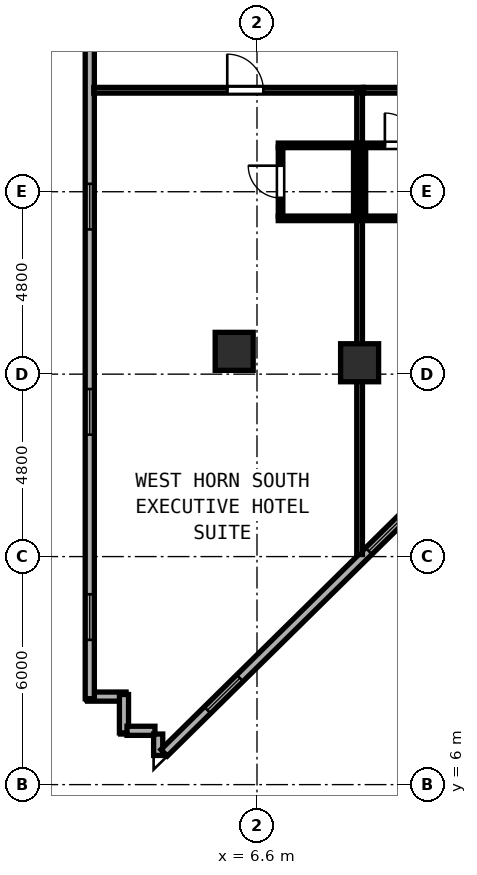
"""IFC4 building model, lengths in metres.
Left out: names, types, materials, properties, quantities, classifications, styles, units other than length and angle.
Written with IfcOpenShell. Run it as: python <this file> out.ifc"""

import sys

from ifc_helpers import new_model, si_unit, direction, frame, frame_2d, origin, origin_2d, place, context, subcontext, project, spatial, rectangle, hollow_rectangle, extrude, element, fill, save


model = new_model("IFC4")
c1 = context("Model", 3, precision=1e-05, world=origin(), true_north=direction((0.0, 1.0)))
c2 = subcontext(c1, "Body", "Model", "MODEL_VIEW")
j1 = project(units=[si_unit("LENGTHUNIT", "METRE"), si_unit("PLANEANGLEUNIT", "RADIAN")], contexts=[c1])
p1 = place(None, origin())
s1 = spatial("IfcSite", under=j1, at=p1, CompositionType="ELEMENT")
p2 = place(p1, origin())
s2 = spatial("IfcBuilding", under=s1, at=p2, CompositionType="ELEMENT")
p3 = place(p2, frame((0.0, 0.0, 47.6)))
s3 = spatial("IfcBuildingStorey", under=s2, at=p3, CompositionType="ELEMENT", Elevation=47.6)
for number, where, z_axis, x_axis in (
    (1, (6.0, 17.4, 0.0), (0.0, 0.0, 1.0), (1.0, 0.0, 0.0)),
    (2, (9.3, 17.1, 0.0), (0.0, 0.0, 1.0), (1.0, 0.0, 0.0)),
):
    element("IfcColumn", number, at=place(p3, frame(where, z_axis=z_axis, x_axis=x_axis)), inside=s3, PredefinedType="COLUMN", context=c2, shape_type="SweptSolid", body=[
        extrude(hollow_rectangle(XDim=1.0, YDim=1.0, WallThickness=0.038, at=origin_2d()), origin(), (0.0, 0.0, 1.0), 3.8),
    ])
for number, where, z_axis, x_axis in (
    (3, (2.145, 8.316, 0.0), (0.0, 0.0, 1.0), (1.0, 0.0, 0.0)),
    (4, (3.1, 8.371, 0.0), (0.0, 0.0, 1.0), (0.0, -1.0, 0.0)),
):
    element("IfcWall", number, at=place(p3, frame(where, z_axis=z_axis, x_axis=x_axis)), inside=s3, PredefinedType="SOLIDWALL", context=c2, shape_type="SweptSolid", body=[
        extrude(rectangle(XDim=1.01, YDim=0.24, at=frame_2d((0.505, 0.0))), origin(), (0.0, 0.0, 1.0), 3.6),
    ])
p4 = place(p3, frame((3.18, 7.416, 0.0), z_axis=(0.0, 0.0, 1.0), x_axis=(1.0, 0.0, 0.0)))
e5 = element("IfcWall", 5, at=p4, inside=s3, PredefinedType="SOLIDWALL", context=c2, shape_type="SweptSolid", body=[
    extrude(rectangle(XDim=0.735, YDim=0.24, at=frame_2d((0.368, 0.0))), origin(), (0.0, 0.0, 1.0), 3.6),
])
p5 = place(p3, frame((4.0, 7.331, 0.0), z_axis=(0.0, 0.0, 1.0), x_axis=(0.0, -1.0, 0.0)))
e6 = element("IfcWall", 6, at=p5, inside=s3, PredefinedType="SOLIDWALL", context=c2, shape_type="SweptSolid", body=[
    extrude(rectangle(XDim=0.563, YDim=0.24, at=frame_2d((0.282, 0.0))), origin(), (0.0, 0.0, 1.0), 3.6),
])
p6 = place(p3, frame((4.156, 6.837, 0.0), z_axis=(0.0, 0.0, 1.0), x_axis=(0.712195287167, 0.701981390735, 0.0)))
e7 = element("IfcWall", 7, at=p6, inside=s3, PredefinedType="SOLIDWALL", context=c2, shape_type="SweptSolid", body=[
    extrude(rectangle(XDim=10.9, YDim=0.24, at=frame_2d((5.45, 0.0))), origin(), (0.0, 0.0, 1.0), 3.6),
])
p7 = place(p6, frame((1.6, 0.0, 0.85)))
e8 = element("IfcOpeningElement", 8, at=p7, cuts=e7, PredefinedType="OPENING", context=c2, shape_type="SweptSolid", body=[
    extrude(rectangle(XDim=1.2, YDim=1.85, at=frame_2d((0.6, 0.925))), frame((0.0, 0.13, 0.0), z_axis=(0.0, -1.0, 0.0), x_axis=(1.0, 0.0, 0.0)), (0.0, 0.0, 1.0), 0.26),
])
p8 = place(p6, frame((7.561, 0.0, 0.85)))
e9 = element("IfcOpeningElement", 9, at=p8, cuts=e7, PredefinedType="OPENING", context=c2, shape_type="SweptSolid", body=[
    extrude(rectangle(XDim=1.2, YDim=1.85, at=frame_2d((0.6, 0.925))), frame((0.0, 0.13, 0.0), z_axis=(0.0, -1.0, 0.0), x_axis=(1.0, 0.0, 0.0)), (0.0, 0.0, 1.0), 0.26),
])
p9 = place(p3, frame((2.2, 28.808, 0.0), z_axis=(0.0, 0.0, 1.0), x_axis=(0.0, -1.0, 0.0)))
e10 = element("IfcWall", 10, at=p9, inside=s3, PredefinedType="SOLIDWALL", context=c2, shape_type="SweptSolid", body=[
    extrude(rectangle(XDim=20.547, YDim=0.24, at=frame_2d((10.274, 0.0))), origin(), (0.0, 0.0, 1.0), 3.6),
])
p10 = place(p9, frame((1.093, 0.0, 0.85)))
e11 = element("IfcOpeningElement", 11, at=p10, cuts=e10, PredefinedType="OPENING", context=c2, shape_type="SweptSolid", body=[
    extrude(rectangle(XDim=1.2, YDim=1.85, at=frame_2d((0.6, 0.925))), frame((0.0, 0.13, 0.0), z_axis=(0.0, -1.0, 0.0), x_axis=(1.0, 0.0, 0.0)), (0.0, 0.0, 1.0), 0.26),
])
p11 = place(p9, frame((7.0, 0.0, 0.85)))
e12 = element("IfcOpeningElement", 12, at=p11, cuts=e10, PredefinedType="OPENING", context=c2, shape_type="SweptSolid", body=[
    extrude(rectangle(XDim=1.2, YDim=1.85, at=frame_2d((0.6, 0.925))), frame((0.0, 0.13, 0.0), z_axis=(0.0, -1.0, 0.0), x_axis=(1.0, 0.0, 0.0)), (0.0, 0.0, 1.0), 0.26),
])
p12 = place(p9, frame((12.4, 0.0, 0.85)))
e13 = element("IfcOpeningElement", 13, at=p12, cuts=e10, PredefinedType="OPENING", context=c2, shape_type="SweptSolid", body=[
    extrude(rectangle(XDim=1.2, YDim=1.85, at=frame_2d((0.6, 0.925))), frame((0.0, 0.13, 0.0), z_axis=(0.0, -1.0, 0.0), x_axis=(1.0, 0.0, 0.0)), (0.0, 0.0, 1.0), 0.26),
])
p13 = place(p9, frame((17.8, 0.0, 0.85)))
e14 = element("IfcOpeningElement", 14, at=p13, cuts=e10, PredefinedType="OPENING", context=c2, shape_type="SweptSolid", body=[
    extrude(rectangle(XDim=1.2, YDim=1.85, at=frame_2d((0.6, 0.925))), frame((0.0, 0.13, 0.0), z_axis=(0.0, -1.0, 0.0), x_axis=(1.0, 0.0, 0.0)), (0.0, 0.0, 1.0), 0.26),
])
p14 = place(p3, frame((2.305, 24.27, 0.0), z_axis=(0.0, 0.0, 1.0), x_axis=(1.0, 0.0, 0.0)))
e15 = element("IfcWall", 15, at=p14, inside=s3, PredefinedType="PARTITIONING", context=c2, shape_type="SweptSolid", body=[
    extrude(rectangle(XDim=7.095, YDim=0.15, at=frame_2d((3.547, 0.0))), origin(), (0.0, 0.0, 1.0), 3.6),
])
p15 = place(p14, frame((4.462, 0.0, 0.0), z_axis=(0.0, 0.0, 1.0), x_axis=(-1.0, 0.0, 0.0)))
e16 = element("IfcOpeningElement", 16, at=p15, cuts=e15, PredefinedType="OPENING", context=c2, shape_type="SweptSolid", body=[
    extrude(rectangle(XDim=0.95, YDim=2.18, at=frame_2d((0.475, 1.09))), frame((0.0, 0.085, 0.0), z_axis=(0.0, -1.0, 0.0), x_axis=(1.0, 0.0, 0.0)), (0.0, 0.0, 1.0), 0.17),
])
p16 = place(p3, frame((9.3, 12.054, 0.0), z_axis=(0.0, 0.0, 1.0), x_axis=(0.0, 1.0, 0.0)))
e17 = element("IfcWall", 17, at=p16, inside=s3, PredefinedType="PARTITIONING", context=c2, shape_type="SweptSolid", body=[
    extrude(rectangle(XDim=12.156, YDim=0.15, at=frame_2d((6.078, 0.0))), origin(), (0.0, 0.0, 1.0), 3.6),
])
for number, where, z_axis, x_axis in (
    (18, (7.16, 22.82, 0.0), (0.0, 0.0, 1.0), (1.0, 0.0, 0.0)),
    (19, (7.16, 20.9, 0.0), (0.0, 0.0, 1.0), (1.0, 0.0, 0.0)),
):
    element("IfcWall", number, at=place(p3, frame(where, z_axis=z_axis, x_axis=x_axis)), inside=s3, PredefinedType="PARTITIONING", context=c2, shape_type="SweptSolid", body=[
        extrude(rectangle(XDim=2.08, YDim=0.12, at=frame_2d((1.04, 0.0))), origin(), (0.0, 0.0, 1.0), 3.6),
    ])
p17 = place(p3, frame((7.22, 20.945, 0.0), z_axis=(0.0, 0.0, 1.0), x_axis=(0.0, 1.0, 0.0)))
e20 = element("IfcWall", 20, at=p17, inside=s3, PredefinedType="PARTITIONING", context=c2, shape_type="SweptSolid", body=[
    extrude(rectangle(XDim=1.83, YDim=0.12, at=frame_2d((0.915, 0.0))), origin(), (0.0, 0.0, 1.0), 3.6),
])
p18 = place(p17, frame((1.34, 0.0, 0.0), z_axis=(0.0, 0.0, 1.0), x_axis=(-1.0, 0.0, 0.0)))
e21 = element("IfcOpeningElement", 21, at=p18, cuts=e20, PredefinedType="OPENING", context=c2, shape_type="SweptSolid", body=[
    extrude(rectangle(XDim=0.85, YDim=2.1, at=frame_2d((0.425, 1.05))), frame((0.0, 0.07, 0.0), z_axis=(0.0, -1.0, 0.0), x_axis=(1.0, 0.0, 0.0)), (0.0, 0.0, 1.0), 0.14),
])
p19 = place(p3, frame((9.2, 20.945, 0.0), z_axis=(0.0, 0.0, 1.0), x_axis=(0.0, 1.0, 0.0)))
e22 = element("IfcWall", 22, at=p19, inside=s3, PredefinedType="PARTITIONING", context=c2, shape_type="SweptSolid", body=[
    extrude(rectangle(XDim=1.83, YDim=0.12, at=frame_2d((0.915, 0.0))), origin(), (0.0, 0.0, 1.0), 3.6),
])
p20 = place(p3, frame((9.402, 24.27, 0.0), z_axis=(0.0, 0.0, 1.0), x_axis=(1.0, 0.0, 0.0)))
e23 = element("IfcWall", 23, at=p20, inside=s3, PredefinedType="PARTITIONING", context=c2, shape_type="SweptSolid", body=[
    extrude(rectangle(XDim=2.296, YDim=0.15, at=frame_2d((1.148, 0.0))), origin(), (0.0, 0.0, 1.0), 3.6),
])
p21 = place(p20, frame((1.934, 0.0, 0.0), z_axis=(0.0, 0.0, 1.0), x_axis=(-1.0, 0.0, 0.0)))
e24 = element("IfcOpeningElement", 24, at=p21, cuts=e23, PredefinedType="OPENING", context=c2, shape_type="SweptSolid", body=[
    extrude(rectangle(XDim=0.95, YDim=2.15, at=frame_2d((0.475, 1.075))), frame((0.0, 0.085, 0.0), z_axis=(0.0, -1.0, 0.0), x_axis=(1.0, 0.0, 0.0)), (0.0, 0.0, 1.0), 0.17),
])
p22 = place(p3, frame((9.36, 22.82, 0.0), z_axis=(0.0, 0.0, 1.0), x_axis=(1.0, 0.0, 0.0)))
e25 = element("IfcWall", 25, at=p22, inside=s3, PredefinedType="PARTITIONING", context=c2, shape_type="SweptSolid", body=[
    extrude(rectangle(XDim=2.08, YDim=0.12, at=frame_2d((1.04, 0.0))), origin(), (0.0, 0.0, 1.0), 3.6),
])
p23 = place(p22, frame((1.455, 0.0, 0.0), z_axis=(0.0, 0.0, 1.0), x_axis=(-1.0, 0.0, 0.0)))
e26 = element("IfcOpeningElement", 26, at=p23, cuts=e25, PredefinedType="OPENING", context=c2, shape_type="SweptSolid", body=[
    extrude(rectangle(XDim=0.85, YDim=2.1, at=frame_2d((0.425, 1.05))), frame((0.0, 0.07, 0.0), z_axis=(0.0, -1.0, 0.0), x_axis=(1.0, 0.0, 0.0)), (0.0, 0.0, 1.0), 0.14),
])
p24 = place(p3, frame((9.36, 20.9, 0.0), z_axis=(0.0, 0.0, 1.0), x_axis=(1.0, 0.0, 0.0)))
e27 = element("IfcWall", 27, at=p24, inside=s3, PredefinedType="PARTITIONING", context=c2, shape_type="SweptSolid", body=[
    extrude(rectangle(XDim=2.08, YDim=0.12, at=frame_2d((1.04, 0.0))), origin(), (0.0, 0.0, 1.0), 3.6),
])
p25 = place(p3, frame((9.4, 20.945, 0.0), z_axis=(0.0, 0.0, 1.0), x_axis=(0.0, 1.0, 0.0)))
e28 = element("IfcWall", 28, at=p25, inside=s3, PredefinedType="PARTITIONING", context=c2, shape_type="SweptSolid", body=[
    extrude(rectangle(XDim=1.83, YDim=0.12, at=frame_2d((0.915, 0.0))), origin(), (0.0, 0.0, 1.0), 3.6),
])
p26 = place(p7, origin())
e29 = element("IfcWindow", 29, at=p26, inside=s3, PartitioningType="SINGLE_PANEL", PredefinedType="WINDOW", context=c2, shape_type="SweptSolid", body=[
    extrude(rectangle(XDim=1.2, YDim=1.85, at=frame_2d((0.6, 0.925))), frame((0.0, 0.03, 0.0), z_axis=(0.0, -1.0, 0.0), x_axis=(1.0, 0.0, 0.0)), (0.0, 0.0, 1.0), 0.06),
])
fill(e8, e29)
p27 = place(p8, origin())
e30 = element("IfcWindow", 30, at=p27, inside=s3, PartitioningType="SINGLE_PANEL", PredefinedType="WINDOW", context=c2, shape_type="SweptSolid", body=[
    extrude(rectangle(XDim=1.2, YDim=1.85, at=frame_2d((0.6, 0.925))), frame((0.0, 0.03, 0.0), z_axis=(0.0, -1.0, 0.0), x_axis=(1.0, 0.0, 0.0)), (0.0, 0.0, 1.0), 0.06),
])
fill(e9, e30)
p28 = place(p11, origin())
e31 = element("IfcWindow", 31, at=p28, inside=s3, PartitioningType="SINGLE_PANEL", PredefinedType="WINDOW", context=c2, shape_type="SweptSolid", body=[
    extrude(rectangle(XDim=1.2, YDim=1.85, at=frame_2d((0.6, 0.925))), frame((0.0, 0.03, 0.0), z_axis=(0.0, -1.0, 0.0), x_axis=(1.0, 0.0, 0.0)), (0.0, 0.0, 1.0), 0.06),
])
fill(e12, e31)
p29 = place(p12, origin())
e32 = element("IfcWindow", 32, at=p29, inside=s3, PartitioningType="SINGLE_PANEL", PredefinedType="WINDOW", context=c2, shape_type="SweptSolid", body=[
    extrude(rectangle(XDim=1.2, YDim=1.85, at=frame_2d((0.6, 0.925))), frame((0.0, 0.03, 0.0), z_axis=(0.0, -1.0, 0.0), x_axis=(1.0, 0.0, 0.0)), (0.0, 0.0, 1.0), 0.06),
])
fill(e13, e32)
p30 = place(p13, origin())
e33 = element("IfcWindow", 33, at=p30, inside=s3, PartitioningType="SINGLE_PANEL", PredefinedType="WINDOW", context=c2, shape_type="SweptSolid", body=[
    extrude(rectangle(XDim=1.2, YDim=1.85, at=frame_2d((0.6, 0.925))), frame((0.0, 0.03, 0.0), z_axis=(0.0, -1.0, 0.0), x_axis=(1.0, 0.0, 0.0)), (0.0, 0.0, 1.0), 0.06),
])
fill(e14, e33)
p31 = place(p15, origin())
e34 = element("IfcDoor", 34, at=p31, inside=s3, OperationType="SINGLE_SWING_RIGHT", PredefinedType="DOOR", context=c2, shape_type="SweptSolid", body=[
    extrude(rectangle(XDim=0.95, YDim=2.18, at=frame_2d((0.475, 1.09))), frame((0.0, 0.025, 0.0), z_axis=(0.0, -1.0, 0.0), x_axis=(1.0, 0.0, 0.0)), (0.0, 0.0, 1.0), 0.05),
])
fill(e16, e34)
p32 = place(p18, origin())
e35 = element("IfcDoor", 35, at=p32, inside=s3, OperationType="SINGLE_SWING_LEFT", PredefinedType="DOOR", context=c2, shape_type="SweptSolid", body=[
    extrude(rectangle(XDim=0.85, YDim=2.1, at=frame_2d((0.425, 1.05))), frame((0.0, 0.025, 0.0), z_axis=(0.0, -1.0, 0.0), x_axis=(1.0, 0.0, 0.0)), (0.0, 0.0, 1.0), 0.05),
])
fill(e21, e35)
p33 = place(p23, origin())
e36 = element("IfcDoor", 36, at=p33, inside=s3, OperationType="SINGLE_SWING_RIGHT", PredefinedType="DOOR", context=c2, shape_type="SweptSolid", body=[
    extrude(rectangle(XDim=0.85, YDim=2.1, at=frame_2d((0.425, 1.05))), frame((0.0, 0.025, 0.0), z_axis=(0.0, -1.0, 0.0), x_axis=(1.0, 0.0, 0.0)), (0.0, 0.0, 1.0), 0.05),
])
fill(e26, e36)
save(model, sys.argv[1])
